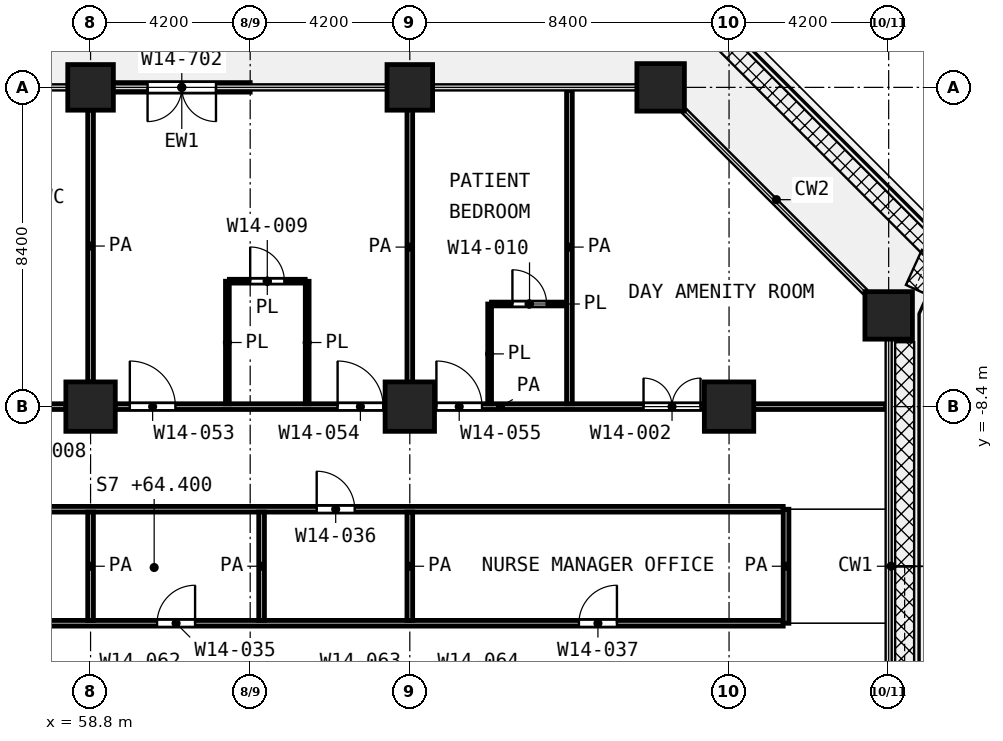
"""IFC4 building model, lengths in metres.
Left out: names, types, materials, properties, quantities, classifications, styles, units other than length and angle.
Written with IfcOpenShell. Run it as: python <this file> out.ifc"""

import sys

from ifc_helpers import new_model, si_unit, direction, frame, frame_2d, origin, origin_2d, place, context, subcontext, project, spatial, rectangle, extrude, element, fill, save


model = new_model("IFC4")
c1 = context("Model", 3, precision=1e-05, world=origin(), true_north=direction((0.0, 1.0)))
c2 = subcontext(c1, "Body", "Model", "MODEL_VIEW")
j1 = project(units=[si_unit("LENGTHUNIT", "METRE"), si_unit("PLANEANGLEUNIT", "RADIAN")], contexts=[c1])
p1 = place(None, origin())
s1 = spatial("IfcSite", under=j1, at=p1, CompositionType="ELEMENT")
p2 = place(p1, origin())
s2 = spatial("IfcBuilding", under=s1, at=p2, CompositionType="ELEMENT")
p3 = place(p2, frame((0.0, 0.0, 64.4)))
s3 = spatial("IfcBuildingStorey", under=s2, at=p3, CompositionType="ELEMENT", Elevation=64.4)
for number, where, z_axis, x_axis in (
    (1, (58.8, 0.0, 0.0), (0.0, 0.0, 1.0), (1.0, 0.0, 0.0)),
    (2, (67.2, 0.0, 0.0), (0.0, 0.0, 1.0), (1.0, 0.0, 0.0)),
):
    element("IfcColumn", number, at=place(p3, frame(where, z_axis=z_axis, x_axis=x_axis)), inside=s3, PredefinedType="COLUMN", context=c2, shape_type="SweptSolid", body=[
        extrude(rectangle(XDim=1.2, YDim=1.2, at=origin_2d()), origin(), (0.0, 0.0, 1.0), 4.2),
    ])
for number, where, z_axis, x_axis in (
    (3, (73.8, 0.0, 0.0), (0.0, 0.0, 1.0), (1.0, 0.0, 0.0)),
    (4, (79.8, -6.0, 0.0), (0.0, 0.0, 1.0), (1.0, 0.0, 0.0)),
):
    element("IfcColumn", number, at=place(p3, frame(where, z_axis=z_axis, x_axis=x_axis)), inside=s3, PredefinedType="COLUMN", context=c2, shape_type="SweptSolid", body=[
        extrude(rectangle(XDim=1.25, YDim=1.25, at=origin_2d()), origin(), (0.0, 0.0, 1.0), 4.2),
    ])
for number, where, z_axis, x_axis in (
    (5, (58.8, -8.4, 0.0), (0.0, 0.0, 1.0), (1.0, 0.0, 0.0)),
    (6, (67.2, -8.4, 0.0), (0.0, 0.0, 1.0), (1.0, 0.0, 0.0)),
    (7, (75.6, -8.4, 0.0), (0.0, 0.0, 1.0), (1.0, 0.0, 0.0)),
):
    element("IfcColumn", number, at=place(p3, frame(where, z_axis=z_axis, x_axis=x_axis)), inside=s3, PredefinedType="COLUMN", context=c2, shape_type="SweptSolid", body=[
        extrude(rectangle(XDim=1.3, YDim=1.3, at=origin_2d()), origin(), (0.0, 0.0, 1.0), 4.2),
    ])
p4 = place(p3, frame((63.0, 0.0, 0.0), z_axis=(0.0, 0.0, 1.0), x_axis=(-1.0, 0.0, 0.0)))
e8 = element("IfcWall", 8, at=p4, inside=s3, PredefinedType="SOLIDWALL", context=c2, shape_type="SweptSolid", body=[
    extrude(rectangle(XDim=3.6, YDim=0.25, at=frame_2d((1.8, 0.0))), origin(), (0.0, 0.0, 1.0), 3.78),
])
p5 = place(p4, frame((0.9, 0.0, 0.0)))
e9 = element("IfcOpeningElement", 9, at=p5, cuts=e8, PredefinedType="OPENING", context=c2, shape_type="SweptSolid", body=[
    extrude(rectangle(XDim=1.8, YDim=2.1, at=frame_2d((0.9, 1.05))), frame((0.0, 0.135, 0.0), z_axis=(0.0, -1.0, 0.0), x_axis=(1.0, 0.0, 0.0)), (0.0, 0.0, 1.0), 0.27),
])
p6 = place(p3, frame((69.35, -5.7, 0.0), z_axis=(0.0, 0.0, 1.0), x_axis=(1.0, 0.0, 0.0)))
e10 = element("IfcWall", 10, at=p6, inside=s3, PredefinedType="PARTITIONING", context=c2, shape_type="SweptSolid", body=[
    extrude(rectangle(XDim=1.975, YDim=0.1, at=frame_2d((0.987, 0.0))), origin(), (0.0, 0.0, 1.0), 3.9),
])
p7 = place(p6, frame((0.55, 0.0, 0.0)))
e11 = element("IfcOpeningElement", 11, at=p7, cuts=e10, PredefinedType="OPENING", context=c2, shape_type="SweptSolid", body=[
    extrude(rectangle(XDim=0.9, YDim=2.1, at=frame_2d((0.45, 1.05))), frame((0.0, 0.06, 0.0), z_axis=(0.0, -1.0, 0.0), x_axis=(1.0, 0.0, 0.0)), (0.0, 0.0, 1.0), 0.12),
])
p8 = place(p3, frame((62.452, -5.1, 0.0), z_axis=(0.0, 0.0, 1.0), x_axis=(1.0, 0.0, 0.0)))
e12 = element("IfcWall", 12, at=p8, inside=s3, PredefinedType="PARTITIONING", context=c2, shape_type="SweptSolid", body=[
    extrude(rectangle(XDim=1.996, YDim=0.1, at=frame_2d((0.998, 0.0))), origin(), (0.0, 0.0, 1.0), 3.9),
])
p9 = place(p8, frame((0.548, 0.0, 0.0)))
e13 = element("IfcOpeningElement", 13, at=p9, cuts=e12, PredefinedType="OPENING", context=c2, shape_type="SweptSolid", body=[
    extrude(rectangle(XDim=0.9, YDim=2.1, at=frame_2d((0.45, 1.05))), frame((0.0, 0.06, 0.0), z_axis=(0.0, -1.0, 0.0), x_axis=(1.0, 0.0, 0.0)), (0.0, 0.0, 1.0), 0.12),
])
p10 = place(p3, frame((62.4, -8.325, 0.0), z_axis=(0.0, 0.0, 1.0), x_axis=(0.0, 1.0, 0.0)))
e14 = element("IfcWall", 14, at=p10, inside=s3, PredefinedType="PARTITIONING", context=c2, shape_type="SweptSolid", body=[
    extrude(rectangle(XDim=3.224, YDim=0.1, at=frame_2d((1.612, 0.0))), origin(), (0.0, 0.0, 1.0), 3.9),
])
p11 = place(p3, frame((64.5, -8.325, 0.0), z_axis=(0.0, 0.0, 1.0), x_axis=(0.0, 1.0, 0.0)))
e15 = element("IfcWall", 15, at=p11, inside=s3, PredefinedType="PARTITIONING", context=c2, shape_type="SweptSolid", body=[
    extrude(rectangle(XDim=3.223, YDim=0.1, at=frame_2d((1.611, 0.0))), origin(), (0.0, 0.0, 1.0), 3.9),
])
p12 = place(p3, frame((69.3, -8.325, 0.0), z_axis=(0.0, 0.0, 1.0), x_axis=(0.0, 1.0, 0.0)))
e16 = element("IfcWall", 16, at=p12, inside=s3, PredefinedType="PARTITIONING", context=c2, shape_type="SweptSolid", body=[
    extrude(rectangle(XDim=2.625, YDim=0.1, at=frame_2d((1.312, 0.0))), origin(), (0.0, 0.0, 1.0), 3.9),
])
p13 = place(p3, frame((29.475, -14.1, 0.0), z_axis=(0.0, 0.0, 1.0), x_axis=(1.0, 0.0, 0.0)))
e17 = element("IfcWall", 17, at=p13, inside=s3, PredefinedType="PARTITIONING", context=c2, shape_type="SweptSolid", body=[
    extrude(rectangle(XDim=47.55, YDim=0.15, at=frame_2d((23.775, 0.0))), origin(), (0.0, 0.0, 1.0), 3.9),
])
p14 = place(p13, frame((10.125, 0.0, 0.0)))
e18 = element("IfcOpeningElement", 18, at=p14, cuts=e17, PredefinedType="OPENING", context=c2, shape_type="SweptSolid", body=[
    extrude(rectangle(XDim=1.2, YDim=2.1, at=frame_2d((0.6, 1.05))), frame((0.0, 0.085, 0.0), z_axis=(0.0, -1.0, 0.0), x_axis=(1.0, 0.0, 0.0)), (0.0, 0.0, 1.0), 0.17),
])
p15 = place(p13, frame((20.575, 0.0, 0.0)))
e19 = element("IfcOpeningElement", 19, at=p15, cuts=e17, PredefinedType="OPENING", context=c2, shape_type="SweptSolid", body=[
    extrude(rectangle(XDim=1.0, YDim=2.1, at=frame_2d((0.5, 1.05))), frame((0.0, 0.085, 0.0), z_axis=(0.0, -1.0, 0.0), x_axis=(1.0, 0.0, 0.0)), (0.0, 0.0, 1.0), 0.17),
])
p16 = place(p13, frame((31.075, 0.0, 0.0)))
e20 = element("IfcOpeningElement", 20, at=p16, cuts=e17, PredefinedType="OPENING", context=c2, shape_type="SweptSolid", body=[
    extrude(rectangle(XDim=1.0, YDim=2.1, at=frame_2d((0.5, 1.05))), frame((0.0, 0.085, 0.0), z_axis=(0.0, -1.0, 0.0), x_axis=(1.0, 0.0, 0.0)), (0.0, 0.0, 1.0), 0.17),
])
p17 = place(p13, frame((42.175, 0.0, 0.0)))
e21 = element("IfcOpeningElement", 21, at=p17, cuts=e17, PredefinedType="OPENING", context=c2, shape_type="SweptSolid", body=[
    extrude(rectangle(XDim=1.0, YDim=2.1, at=frame_2d((0.5, 1.05))), frame((0.0, 0.085, 0.0), z_axis=(0.0, -1.0, 0.0), x_axis=(1.0, 0.0, 0.0)), (0.0, 0.0, 1.0), 0.17),
])
p18 = place(p3, frame((29.475, -11.1, 0.0), z_axis=(0.0, 0.0, 1.0), x_axis=(1.0, 0.0, 0.0)))
e22 = element("IfcWall", 22, at=p18, inside=s3, PredefinedType="PARTITIONING", context=c2, shape_type="SweptSolid", body=[
    extrude(rectangle(XDim=47.55, YDim=0.15, at=frame_2d((23.775, 0.0))), origin(), (0.0, 0.0, 1.0), 3.9),
])
p19 = place(p18, frame((26.575, 0.0, 0.0)))
e23 = element("IfcOpeningElement", 23, at=p19, cuts=e22, PredefinedType="OPENING", context=c2, shape_type="SweptSolid", body=[
    extrude(rectangle(XDim=1.0, YDim=2.1, at=frame_2d((0.5, 1.05))), frame((0.0, 0.085, 0.0), z_axis=(0.0, -1.0, 0.0), x_axis=(1.0, 0.0, 0.0)), (0.0, 0.0, 1.0), 0.17),
])
p20 = place(p18, frame((35.275, 0.0, 0.0)))
e24 = element("IfcOpeningElement", 24, at=p20, cuts=e22, PredefinedType="OPENING", context=c2, shape_type="SweptSolid", body=[
    extrude(rectangle(XDim=1.0, YDim=2.1, at=frame_2d((0.5, 1.05))), frame((0.0, 0.085, 0.0), z_axis=(0.0, -1.0, 0.0), x_axis=(1.0, 0.0, 0.0)), (0.0, 0.0, 1.0), 0.17),
])
p21 = place(p18, frame((2.575, 0.0, 0.0)))
e25 = element("IfcOpeningElement", 25, at=p21, cuts=e22, PredefinedType="OPENING", context=c2, shape_type="SweptSolid", body=[
    extrude(rectangle(XDim=1.0, YDim=2.1, at=frame_2d((0.5, 1.05))), frame((0.0, 0.085, 0.0), z_axis=(0.0, -1.0, 0.0), x_axis=(1.0, 0.0, 0.0)), (0.0, 0.0, 1.0), 0.17),
])
p22 = place(p3, frame((51.0, -8.4, 0.0), z_axis=(0.0, 0.0, 1.0), x_axis=(1.0, 0.0, 0.0)))
e26 = element("IfcWall", 26, at=p22, inside=s3, PredefinedType="PARTITIONING", context=c2, shape_type="SweptSolid", body=[
    extrude(rectangle(XDim=7.15, YDim=0.15, at=frame_2d((3.575, 0.0))), origin(), (0.0, 0.0, 1.0), 3.9),
])
p23 = place(p22, frame((5.075, 0.0, 0.0)))
e27 = element("IfcOpeningElement", 27, at=p23, cuts=e26, PredefinedType="OPENING", context=c2, shape_type="SweptSolid", body=[
    extrude(rectangle(XDim=0.9, YDim=2.1, at=frame_2d((0.45, 1.05))), frame((0.0, 0.085, 0.0), z_axis=(0.0, -1.0, 0.0), x_axis=(1.0, 0.0, 0.0)), (0.0, 0.0, 1.0), 0.17),
])
p24 = place(p3, frame((59.45, -8.4, 0.0), z_axis=(0.0, 0.0, 1.0), x_axis=(1.0, 0.0, 0.0)))
e28 = element("IfcWall", 28, at=p24, inside=s3, PredefinedType="PARTITIONING", context=c2, shape_type="SweptSolid", body=[
    extrude(rectangle(XDim=20.27, YDim=0.15, at=frame_2d((10.135, 0.0))), origin(), (0.0, 0.0, 1.0), 3.9),
])
p25 = place(p24, frame((0.383, 0.0, 0.0)))
e29 = element("IfcOpeningElement", 29, at=p25, cuts=e28, PredefinedType="OPENING", context=c2, shape_type="SweptSolid", body=[
    extrude(rectangle(XDim=1.2, YDim=2.1, at=frame_2d((0.6, 1.05))), frame((0.0, 0.085, 0.0), z_axis=(0.0, -1.0, 0.0), x_axis=(1.0, 0.0, 0.0)), (0.0, 0.0, 1.0), 0.17),
])
p26 = place(p24, frame((5.85, 0.0, 0.0)))
e30 = element("IfcOpeningElement", 30, at=p26, cuts=e28, PredefinedType="OPENING", context=c2, shape_type="SweptSolid", body=[
    extrude(rectangle(XDim=1.2, YDim=2.1, at=frame_2d((0.6, 1.05))), frame((0.0, 0.085, 0.0), z_axis=(0.0, -1.0, 0.0), x_axis=(1.0, 0.0, 0.0)), (0.0, 0.0, 1.0), 0.17),
])
p27 = place(p24, frame((8.45, 0.0, 0.0)))
e31 = element("IfcOpeningElement", 31, at=p27, cuts=e28, PredefinedType="OPENING", context=c2, shape_type="SweptSolid", body=[
    extrude(rectangle(XDim=1.2, YDim=2.1, at=frame_2d((0.6, 1.05))), frame((0.0, 0.085, 0.0), z_axis=(0.0, -1.0, 0.0), x_axis=(1.0, 0.0, 0.0)), (0.0, 0.0, 1.0), 0.17),
])
p28 = place(p24, frame((13.9, 0.0, 0.0)))
e32 = element("IfcOpeningElement", 32, at=p28, cuts=e28, PredefinedType="OPENING", context=c2, shape_type="SweptSolid", body=[
    extrude(rectangle(XDim=1.5, YDim=2.1, at=frame_2d((0.75, 1.05))), frame((0.0, 0.085, 0.0), z_axis=(0.0, -1.0, 0.0), x_axis=(1.0, 0.0, 0.0)), (0.0, 0.0, 1.0), 0.17),
])
p29 = place(p3, frame((58.8, -14.025, 0.0), z_axis=(0.0, 0.0, 1.0), x_axis=(0.0, 1.0, 0.0)))
e33 = element("IfcWall", 33, at=p29, inside=s3, PredefinedType="PARTITIONING", context=c2, shape_type="SweptSolid", body=[
    extrude(rectangle(XDim=2.85, YDim=0.15, at=frame_2d((1.425, 0.0))), origin(), (0.0, 0.0, 1.0), 3.9),
])
p30 = place(p3, frame((58.8, -7.75, 0.0), z_axis=(0.0, 0.0, 1.0), x_axis=(0.0, 1.0, 0.0)))
e34 = element("IfcWall", 34, at=p30, inside=s3, PredefinedType="PARTITIONING", context=c2, shape_type="SweptSolid", body=[
    extrude(rectangle(XDim=7.15, YDim=0.15, at=frame_2d((3.575, 0.0))), origin(), (0.0, 0.0, 1.0), 3.9),
])
for number, where, z_axis, x_axis in (
    (35, (63.3, -14.025, 0.0), (0.0, 0.0, 1.0), (0.0, 1.0, 0.0)),
    (36, (67.2, -14.025, 0.0), (0.0, 0.0, 1.0), (0.0, 1.0, 0.0)),
):
    element("IfcWall", number, at=place(p3, frame(where, z_axis=z_axis, x_axis=x_axis)), inside=s3, PredefinedType="PARTITIONING", context=c2, shape_type="SweptSolid", body=[
        extrude(rectangle(XDim=2.85, YDim=0.15, at=frame_2d((1.425, 0.0))), origin(), (0.0, 0.0, 1.0), 3.9),
    ])
for number, where, z_axis, x_axis in (
    (37, (67.2, -8.325, 0.0), (0.0, 0.0, 1.0), (0.0, 1.0, 0.0)),
    (38, (71.4, -8.325, 0.0), (0.0, 0.0, 1.0), (0.0, 1.0, 0.0)),
):
    element("IfcWall", number, at=place(p3, frame(where, z_axis=z_axis, x_axis=x_axis)), inside=s3, PredefinedType="PARTITIONING", context=c2, shape_type="SweptSolid", body=[
        extrude(rectangle(XDim=8.245, YDim=0.15, at=frame_2d((4.123, 0.0))), origin(), (0.0, 0.0, 1.0), 3.9),
    ])
p31 = place(p3, frame((77.1, -14.1, 0.0), z_axis=(0.0, 0.0, 1.0), x_axis=(0.0, 1.0, 0.0)))
e39 = element("IfcWall", 39, at=p31, inside=s3, PredefinedType="PARTITIONING", context=c2, shape_type="SweptSolid", body=[
    extrude(rectangle(XDim=3.0, YDim=0.15, at=frame_2d((1.5, 0.0))), origin(), (0.0, 0.0, 1.0), 3.9),
])
p32 = place(p5, origin())
e40 = element("IfcDoor", 40, at=p32, inside=s3, OperationType="DOUBLE_DOOR_SINGLE_SWING", PredefinedType="DOOR", context=c2, shape_type="SweptSolid", body=[
    extrude(rectangle(XDim=1.8, YDim=2.1, at=frame_2d((0.9, 1.05))), frame((0.0, 0.025, 0.0), z_axis=(0.0, -1.0, 0.0), x_axis=(1.0, 0.0, 0.0)), (0.0, 0.0, 1.0), 0.05),
])
fill(e9, e40)
p33 = place(p25, origin())
e41 = element("IfcDoor", 41, at=p33, inside=s3, OperationType="SINGLE_SWING_LEFT", PredefinedType="DOOR", context=c2, shape_type="SweptSolid", body=[
    extrude(rectangle(XDim=1.2, YDim=2.1, at=frame_2d((0.6, 1.05))), frame((0.0, 0.025, 0.0), z_axis=(0.0, -1.0, 0.0), x_axis=(1.0, 0.0, 0.0)), (0.0, 0.0, 1.0), 0.05),
])
fill(e29, e41)
p34 = place(p26, origin())
e42 = element("IfcDoor", 42, at=p34, inside=s3, OperationType="SINGLE_SWING_LEFT", PredefinedType="DOOR", context=c2, shape_type="SweptSolid", body=[
    extrude(rectangle(XDim=1.2, YDim=2.1, at=frame_2d((0.6, 1.05))), frame((0.0, 0.025, 0.0), z_axis=(0.0, -1.0, 0.0), x_axis=(1.0, 0.0, 0.0)), (0.0, 0.0, 1.0), 0.05),
])
fill(e30, e42)
p35 = place(p9, origin())
e43 = element("IfcDoor", 43, at=p35, inside=s3, OperationType="SINGLE_SWING_LEFT", PredefinedType="DOOR", context=c2, shape_type="SweptSolid", body=[
    extrude(rectangle(XDim=0.9, YDim=2.1, at=frame_2d((0.45, 1.05))), frame((0.0, 0.025, 0.0), z_axis=(0.0, -1.0, 0.0), x_axis=(1.0, 0.0, 0.0)), (0.0, 0.0, 1.0), 0.05),
])
fill(e13, e43)
p36 = place(p27, origin())
e44 = element("IfcDoor", 44, at=p36, inside=s3, OperationType="SINGLE_SWING_LEFT", PredefinedType="DOOR", context=c2, shape_type="SweptSolid", body=[
    extrude(rectangle(XDim=1.2, YDim=2.1, at=frame_2d((0.6, 1.05))), frame((0.0, 0.025, 0.0), z_axis=(0.0, -1.0, 0.0), x_axis=(1.0, 0.0, 0.0)), (0.0, 0.0, 1.0), 0.05),
])
fill(e31, e44)
p37 = place(p7, origin())
e45 = element("IfcDoor", 45, at=p37, inside=s3, OperationType="SINGLE_SWING_LEFT", PredefinedType="DOOR", context=c2, shape_type="SweptSolid", body=[
    extrude(rectangle(XDim=0.9, YDim=2.1, at=frame_2d((0.45, 1.05))), frame((0.0, 0.025, 0.0), z_axis=(0.0, -1.0, 0.0), x_axis=(1.0, 0.0, 0.0)), (0.0, 0.0, 1.0), 0.05),
])
fill(e11, e45)
p38 = place(p28, origin())
e46 = element("IfcDoor", 46, at=p38, inside=s3, OperationType="DOUBLE_DOOR_SINGLE_SWING", PredefinedType="DOOR", context=c2, shape_type="SweptSolid", body=[
    extrude(rectangle(XDim=1.5, YDim=2.1, at=frame_2d((0.75, 1.05))), frame((0.0, 0.025, 0.0), z_axis=(0.0, -1.0, 0.0), x_axis=(1.0, 0.0, 0.0)), (0.0, 0.0, 1.0), 0.05),
])
fill(e32, e46)
p39 = place(p16, origin())
e47 = element("IfcDoor", 47, at=p39, inside=s3, OperationType="SINGLE_SWING_RIGHT", PredefinedType="DOOR", context=c2, shape_type="SweptSolid", body=[
    extrude(rectangle(XDim=1.0, YDim=2.1, at=frame_2d((0.5, 1.05))), frame((0.0, 0.025, 0.0), z_axis=(0.0, -1.0, 0.0), x_axis=(1.0, 0.0, 0.0)), (0.0, 0.0, 1.0), 0.05),
])
fill(e20, e47)
p40 = place(p20, origin())
e48 = element("IfcDoor", 48, at=p40, inside=s3, OperationType="SINGLE_SWING_LEFT", PredefinedType="DOOR", context=c2, shape_type="SweptSolid", body=[
    extrude(rectangle(XDim=1.0, YDim=2.1, at=frame_2d((0.5, 1.05))), frame((0.0, 0.025, 0.0), z_axis=(0.0, -1.0, 0.0), x_axis=(1.0, 0.0, 0.0)), (0.0, 0.0, 1.0), 0.05),
])
fill(e24, e48)
p41 = place(p17, origin())
e49 = element("IfcDoor", 49, at=p41, inside=s3, OperationType="SINGLE_SWING_RIGHT", PredefinedType="DOOR", context=c2, shape_type="SweptSolid", body=[
    extrude(rectangle(XDim=1.0, YDim=2.1, at=frame_2d((0.5, 1.05))), frame((0.0, 0.025, 0.0), z_axis=(0.0, -1.0, 0.0), x_axis=(1.0, 0.0, 0.0)), (0.0, 0.0, 1.0), 0.05),
])
fill(e21, e49)
save(model, sys.argv[1])
